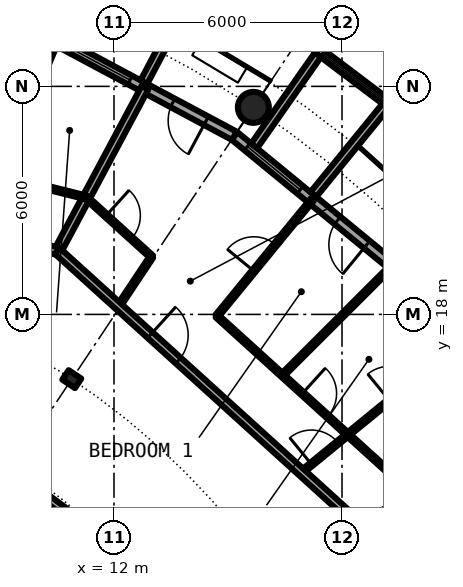
"""IFC4 building model, lengths in metres.
Left out: names, types, materials, properties, quantities, classifications, styles, units other than length and angle.
Written with IfcOpenShell. Run it as: python <this file> out.ifc"""

import sys

from ifc_helpers import new_model, si_unit, direction, frame, frame_2d, origin, origin_2d, place, context, subcontext, project, spatial, rectangle, circle, hollow_circle, i_section, extrude, element, fill, save


model = new_model("IFC4")
c1 = context("Model", 3, precision=1e-05, world=origin(), true_north=direction((0.0, 1.0)))
c2 = subcontext(c1, "Body", "Model", "MODEL_VIEW")
j1 = project(units=[si_unit("LENGTHUNIT", "METRE"), si_unit("PLANEANGLEUNIT", "RADIAN")], contexts=[c1])
p1 = place(None, origin())
s1 = spatial("IfcSite", under=j1, at=p1, CompositionType="ELEMENT")
p2 = place(p1, origin())
s2 = spatial("IfcBuilding", under=s1, at=p2, CompositionType="ELEMENT")
p3 = place(p2, frame((0.0, 0.0, 190.2)))
s3 = spatial("IfcBuildingStorey", under=s2, at=p3, CompositionType="ELEMENT", Elevation=190.2)
p4 = place(p3, frame((15.667, 23.448, 0.0), z_axis=(0.0, 0.0, 1.0), x_axis=(1.0, 0.0, 0.0)))
e1 = element("IfcColumn", 1, at=p4, inside=s3, PredefinedType="COLUMN", context=c2, shape_type="SweptSolid", body=[
    extrude(hollow_circle(Radius=0.406, WallThickness=0.03, at=origin_2d()), origin(), (0.0, 0.0, 1.0), 3.05),
])
p5 = place(p3, frame((10.889, 16.297, 0.0), z_axis=(0.0, 0.0, 1.0), x_axis=(0.55557023302, 0.831469612303, 0.0)))
e2 = element("IfcColumn", 2, at=p5, inside=s3, PredefinedType="COLUMN", context=c2, shape_type="SweptSolid", body=[
    extrude(i_section(OverallWidth=0.3, OverallDepth=0.4, WebThickness=0.013, FlangeThickness=0.024, FilletRadius=0.027, at=origin_2d()), origin(), (0.0, 0.0, 1.0), 3.05),
])
p6 = place(p3, frame((19.304, 19.304, 0.0), z_axis=(0.0, 0.0, 1.0), x_axis=(-0.773019449054, 0.634382322723, 0.0)))
e3 = element("IfcWall", 3, at=p6, inside=s3, PredefinedType="SOLIDWALL", context=c2, shape_type="SweptSolid", body=[
    extrude(rectangle(XDim=5.352, YDim=0.25, at=frame_2d((2.676, 0.0))), origin(), (0.0, 0.0, 1.0), 2.7),
])
p7 = place(p6, frame((0.841, 0.0, 0.0)))
e4 = element("IfcOpeningElement", 4, at=p7, cuts=e3, PredefinedType="OPENING", context=c2, shape_type="SweptSolid", body=[
    extrude(rectangle(XDim=1.0, YDim=2.2, at=frame_2d((0.5, 1.1))), frame((0.0, 0.135, 0.0), z_axis=(0.0, -1.0, 0.0), x_axis=(1.0, 0.0, 0.0)), (0.0, 0.0, 1.0), 0.27),
])
p8 = place(p6, frame((3.111, 0.0, 0.3)))
e5 = element("IfcOpeningElement", 5, at=p8, cuts=e3, PredefinedType="OPENING", context=c2, shape_type="SweptSolid", body=[
    extrude(rectangle(XDim=1.8, YDim=2.1, at=frame_2d((0.9, 1.05))), frame((0.0, 0.135, 0.0), z_axis=(0.0, -1.0, 0.0), x_axis=(1.0, 0.0, 0.0)), (0.0, 0.0, 1.0), 0.27),
])
p9 = place(p3, frame((19.289, 23.497, -0.03), z_axis=(0.0, 0.0, 1.0), x_axis=(-0.797887588059, 0.602806268067, 0.0)))
e6 = element("IfcWall", 6, at=p9, inside=s3, PredefinedType="SOLIDWALL", context=c2, shape_type="SweptSolid", body=[
    extrude(rectangle(XDim=2.447, YDim=0.2, at=frame_2d((1.223, 0.0))), origin(), (0.0, 0.0, 1.0), 2.73),
])
p10 = place(p9, frame((0.183, 0.0, 0.33)))
e7 = element("IfcOpeningElement", 7, at=p10, cuts=e6, PredefinedType="OPENING", context=c2, shape_type="SweptSolid", body=[
    extrude(circle(Radius=1.04, at=frame_2d((1.04, 1.04))), frame((0.0, 0.11, 0.0), z_axis=(0.0, -1.0, 0.0), x_axis=(1.0, 0.0, 0.0)), (0.0, 0.0, 1.0), 0.22),
])
p11 = place(p3, frame((17.246, 21.155, -0.03), z_axis=(0.0, 0.0, 1.0), x_axis=(0.631741648902, 0.775179004516, 0.0)))
e8 = element("IfcWall", 8, at=p11, inside=s3, PredefinedType="SOLIDWALL", context=c2, shape_type="SweptSolid", body=[
    extrude(rectangle(XDim=3.006, YDim=0.2, at=frame_2d((1.503, 0.0))), origin(), (0.0, 0.0, 1.0), 2.73),
])
p12 = place(p3, frame((15.688, 22.433, -0.03), z_axis=(0.0, 0.0, 1.0), x_axis=(0.573260687834, 0.819373043115, 0.0)))
e9 = element("IfcWall", 9, at=p12, inside=s3, PredefinedType="SOLIDWALL", context=c2, shape_type="SweptSolid", body=[
    extrude(rectangle(XDim=2.925, YDim=0.2, at=frame_2d((1.463, 0.0))), origin(), (0.0, 0.0, 1.0), 2.73),
])
p13 = place(p3, frame((15.167, 22.699, 0.0), z_axis=(0.0, 0.0, 1.0), x_axis=(-0.881915646801, 0.471407246368, 0.0)))
e10 = element("IfcWall", 10, at=p13, inside=s3, PredefinedType="SOLIDWALL", context=c2, shape_type="SweptSolid", body=[
    extrude(rectangle(XDim=5.352, YDim=0.25, at=frame_2d((2.676, 0.0))), origin(), (0.0, 0.0, 1.0), 2.7),
])
p14 = place(p13, frame((0.841, 0.0, 0.0)))
e11 = element("IfcOpeningElement", 11, at=p14, cuts=e10, PredefinedType="OPENING", context=c2, shape_type="SweptSolid", body=[
    extrude(rectangle(XDim=1.0, YDim=2.2, at=frame_2d((0.5, 1.1))), frame((0.0, 0.135, 0.0), z_axis=(0.0, -1.0, 0.0), x_axis=(1.0, 0.0, 0.0)), (0.0, 0.0, 1.0), 0.27),
])
p15 = place(p13, frame((3.111, 0.0, 0.3)))
e12 = element("IfcOpeningElement", 12, at=p15, cuts=e10, PredefinedType="OPENING", context=c2, shape_type="SweptSolid", body=[
    extrude(rectangle(XDim=1.8, YDim=2.1, at=frame_2d((0.9, 1.05))), frame((0.0, 0.135, 0.0), z_axis=(0.0, -1.0, 0.0), x_axis=(1.0, 0.0, 0.0)), (0.0, 0.0, 1.0), 0.27),
])
p16 = place(p3, frame((12.787, 24.113, -0.03), z_axis=(0.0, 0.0, 1.0), x_axis=(0.468365282436, 0.883534924159, 0.0)))
e13 = element("IfcWall", 13, at=p16, inside=s3, PredefinedType="SOLIDWALL", context=c2, shape_type="SweptSolid", body=[
    extrude(rectangle(XDim=3.006, YDim=0.2, at=frame_2d((1.503, 0.0))), origin(), (0.0, 0.0, 1.0), 2.73),
])
p17 = place(p3, frame((8.41, 20.193, 0.0), z_axis=(0.0, 0.0, 1.0), x_axis=(0.38420646001, 0.923247202046, 0.0)))
e14 = element("IfcWall", 14, at=p17, inside=s3, PredefinedType="PARTITIONING", context=c2, shape_type="SweptSolid", body=[
    extrude(rectangle(XDim=5.3, YDim=0.1, at=frame_2d((2.65, 0.0))), origin(), (0.0, 0.0, 1.0), 2.7),
])
p18 = place(p17, frame((0.335, 0.0, 0.0)))
e15 = element("IfcOpeningElement", 15, at=p18, cuts=e14, PredefinedType="OPENING", context=c2, shape_type="SweptSolid", body=[
    extrude(rectangle(XDim=0.9, YDim=2.3, at=frame_2d((0.45, 1.15))), frame((0.0, 0.06, 0.0), z_axis=(0.0, -1.0, 0.0), x_axis=(1.0, 0.0, 0.0)), (0.0, 0.0, 1.0), 0.12),
])
p19 = place(p17, frame((2.985, 0.0, 0.0)))
e16 = element("IfcOpeningElement", 16, at=p19, cuts=e14, PredefinedType="OPENING", context=c2, shape_type="SweptSolid", body=[
    extrude(rectangle(XDim=0.9, YDim=2.3, at=frame_2d((0.45, 1.15))), frame((0.0, 0.06, 0.0), z_axis=(0.0, -1.0, 0.0), x_axis=(1.0, 0.0, 0.0)), (0.0, 0.0, 1.0), 0.12),
])
p20 = place(p3, frame((10.516, 19.665, 0.0), z_axis=(0.0, 0.0, 1.0), x_axis=(0.471388689095, 0.881925565903, 0.0)))
e17 = element("IfcWall", 17, at=p20, inside=s3, PredefinedType="PARTITIONING", context=c2, shape_type="SweptSolid", body=[
    extrude(rectangle(XDim=4.875, YDim=0.2, at=frame_2d((2.438, 0.0))), origin(), (0.0, 0.0, 1.0), 2.7),
])
p21 = place(p3, frame((12.118, 18.211, 0.0), z_axis=(0.0, 0.0, 1.0), x_axis=(0.554125989098, 0.832432813028, 0.0)))
e18 = element("IfcWall", 18, at=p21, inside=s3, PredefinedType="PARTITIONING", context=c2, shape_type="SweptSolid", body=[
    extrude(rectangle(XDim=1.57, YDim=0.1, at=frame_2d((0.785, 0.0))), origin(), (0.0, 0.0, 1.0), 2.7),
])
p22 = place(p3, frame((14.709, 17.958, 0.0), z_axis=(0.0, 0.0, 1.0), x_axis=(0.633590098448, 0.773668913133, 0.0)))
e19 = element("IfcWall", 19, at=p22, inside=s3, PredefinedType="PARTITIONING", context=c2, shape_type="SweptSolid", body=[
    extrude(rectangle(XDim=3.962, YDim=0.1, at=frame_2d((1.981, 0.0))), origin(), (0.0, 0.0, 1.0), 2.7),
])
p23 = place(p22, frame((1.531, 0.0, 0.0)))
e20 = element("IfcOpeningElement", 20, at=p23, cuts=e19, PredefinedType="OPENING", context=c2, shape_type="SweptSolid", body=[
    extrude(rectangle(XDim=0.9, YDim=2.3, at=frame_2d((0.45, 1.15))), frame((0.0, 0.06, 0.0), z_axis=(0.0, -1.0, 0.0), x_axis=(1.0, 0.0, 0.0)), (0.0, 0.0, 1.0), 0.12),
])
p24 = place(p3, frame((16.43, 16.398, 0.0), z_axis=(0.0, 0.0, 1.0), x_axis=(0.707722727509, 0.706490297858, 0.0)))
e21 = element("IfcWall", 21, at=p24, inside=s3, PredefinedType="PARTITIONING", context=c2, shape_type="SweptSolid", body=[
    extrude(rectangle(XDim=3.962, YDim=0.1, at=frame_2d((1.981, 0.0))), origin(), (0.0, 0.0, 1.0), 2.7),
])
p25 = place(p3, frame((16.936, 13.845, 0.0), z_axis=(0.0, 0.0, 1.0), x_axis=(0.774310172558, 0.632806255241, 0.0)))
e22 = element("IfcWall", 22, at=p25, inside=s3, PredefinedType="PARTITIONING", context=c2, shape_type="SweptSolid", body=[
    extrude(rectangle(XDim=5.3, YDim=0.1, at=frame_2d((2.65, 0.0))), origin(), (0.0, 0.0, 1.0), 2.7),
])
p26 = place(p25, frame((0.335, 0.0, 0.0)))
e23 = element("IfcOpeningElement", 23, at=p26, cuts=e22, PredefinedType="OPENING", context=c2, shape_type="SweptSolid", body=[
    extrude(rectangle(XDim=0.9, YDim=2.3, at=frame_2d((0.45, 1.15))), frame((0.0, 0.06, 0.0), z_axis=(0.0, -1.0, 0.0), x_axis=(1.0, 0.0, 0.0)), (0.0, 0.0, 1.0), 0.12),
])
p27 = place(p25, frame((2.985, 0.0, 0.0)))
e24 = element("IfcOpeningElement", 24, at=p27, cuts=e22, PredefinedType="OPENING", context=c2, shape_type="SweptSolid", body=[
    extrude(rectangle(XDim=0.9, YDim=2.3, at=frame_2d((0.45, 1.15))), frame((0.0, 0.06, 0.0), z_axis=(0.0, -1.0, 0.0), x_axis=(1.0, 0.0, 0.0)), (0.0, 0.0, 1.0), 0.12),
])
p28 = place(p3, frame((18.542, 12.389, 0.0), z_axis=(0.0, 0.0, 1.0), x_axis=(0.831387096605, 0.55569370664, 0.0)))
e25 = element("IfcWall", 25, at=p28, inside=s3, PredefinedType="PARTITIONING", context=c2, shape_type="SweptSolid", body=[
    extrude(rectangle(XDim=4.875, YDim=0.2, at=frame_2d((2.438, 0.0))), origin(), (0.0, 0.0, 1.0), 2.7),
])
p29 = place(p3, frame((5.137, 16.938, 0.0), z_axis=(0.0, 0.0, 1.0), x_axis=(0.803240181354, -0.595655278712, 0.0)))
e26 = element("IfcWall", 26, at=p29, inside=s3, PredefinedType="PARTITIONING", context=c2, shape_type="SweptSolid", body=[
    extrude(rectangle(XDim=11.928, YDim=0.2, at=frame_2d((5.964, 0.0))), origin(), (0.0, 0.0, 1.0), 2.7),
])
p30 = place(p29, frame((4.612, 0.0, 0.0)))
e27 = element("IfcOpeningElement", 27, at=p30, cuts=e26, PredefinedType="OPENING", context=c2, shape_type="SweptSolid", body=[
    extrude(rectangle(XDim=1.0, YDim=2.3, at=frame_2d((0.5, 1.15))), frame((0.0, 0.11, 0.0), z_axis=(0.0, -1.0, 0.0), x_axis=(1.0, 0.0, 0.0)), (0.0, 0.0, 1.0), 0.22),
])
p31 = place(p3, frame((0.0, 22.3, 0.0), z_axis=(0.0, 0.0, 1.0), x_axis=(0.969975443945, -0.243202874456, 0.0)))
e28 = element("IfcWall", 28, at=p31, inside=s3, PredefinedType="PARTITIONING", context=c2, shape_type="SweptSolid", body=[
    extrude(rectangle(XDim=10.847, YDim=0.2, at=frame_2d((5.423, 0.0))), origin(), (0.0, 0.0, 1.0), 2.7),
])
p32 = place(p31, frame((4.918, 0.0, 0.0)))
e29 = element("IfcOpeningElement", 29, at=p32, cuts=e28, PredefinedType="OPENING", context=c2, shape_type="SweptSolid", body=[
    extrude(rectangle(XDim=1.0, YDim=2.3, at=frame_2d((0.5, 1.15))), frame((0.0, 0.11, 0.0), z_axis=(0.0, -1.0, 0.0), x_axis=(1.0, 0.0, 0.0)), (0.0, 0.0, 1.0), 0.22),
])
p33 = place(p3, frame((10.512, 19.667, 0.0), z_axis=(0.0, 0.0, 1.0), x_axis=(0.740853508928, -0.671666642248, 0.0)))
e30 = element("IfcWall", 30, at=p33, inside=s3, PredefinedType="PARTITIONING", context=c2, shape_type="SweptSolid", body=[
    extrude(rectangle(XDim=10.84, YDim=0.2, at=frame_2d((5.42, 0.0))), origin(), (0.0, 0.0, 1.0), 2.7),
])
p34 = place(p33, frame((3.293, 0.0, 0.0)))
e31 = element("IfcOpeningElement", 31, at=p34, cuts=e30, PredefinedType="OPENING", context=c2, shape_type="SweptSolid", body=[
    extrude(rectangle(XDim=1.0, YDim=2.3, at=frame_2d((0.5, 1.15))), frame((0.0, 0.11, 0.0), z_axis=(0.0, -1.0, 0.0), x_axis=(1.0, 0.0, 0.0)), (0.0, 0.0, 1.0), 0.22),
])
p35 = place(p3, frame((4.502, 22.771, 0.0), z_axis=(0.0, 0.0, 1.0), x_axis=(0.970072433546, -0.242815719578, 0.0)))
e32 = element("IfcWall", 32, at=p35, inside=s3, PredefinedType="PARTITIONING", context=c2, shape_type="SweptSolid", body=[
    extrude(rectangle(XDim=6.973, YDim=0.1, at=frame_2d((3.486, 0.0))), origin(), (0.0, 0.0, 1.0), 2.7),
])
p36 = place(p35, frame((3.036, 0.0, 0.0)))
e33 = element("IfcOpeningElement", 33, at=p36, cuts=e32, PredefinedType="OPENING", context=c2, shape_type="SweptSolid", body=[
    extrude(rectangle(XDim=0.9, YDim=2.3, at=frame_2d((0.45, 1.15))), frame((0.0, 0.06, 0.0), z_axis=(0.0, -1.0, 0.0), x_axis=(1.0, 0.0, 0.0)), (0.0, 0.0, 1.0), 0.12),
])
p37 = place(p3, frame((11.271, 21.074, 0.0), z_axis=(0.0, 0.0, 1.0), x_axis=(0.74087097024, -0.671647381783, 0.0)))
e34 = element("IfcWall", 34, at=p37, inside=s3, PredefinedType="PARTITIONING", context=c2, shape_type="SweptSolid", body=[
    extrude(rectangle(XDim=2.324, YDim=0.1, at=frame_2d((1.162, 0.0))), origin(), (0.0, 0.0, 1.0), 2.7),
])
p38 = place(p37, frame((0.705, 0.0, 0.0)))
e35 = element("IfcOpeningElement", 35, at=p38, cuts=e34, PredefinedType="OPENING", context=c2, shape_type="SweptSolid", body=[
    extrude(rectangle(XDim=0.9, YDim=2.3, at=frame_2d((0.45, 1.15))), frame((0.0, 0.06, 0.0), z_axis=(0.0, -1.0, 0.0), x_axis=(1.0, 0.0, 0.0)), (0.0, 0.0, 1.0), 0.12),
])
p39 = place(p3, frame((14.709, 17.958, 0.0), z_axis=(0.0, 0.0, 1.0), x_axis=(0.740923753351, -0.671589153962, 0.0)))
e36 = element("IfcWall", 36, at=p39, inside=s3, PredefinedType="PARTITIONING", context=c2, shape_type="SweptSolid", body=[
    extrude(rectangle(XDim=6.969, YDim=0.1, at=frame_2d((3.484, 0.0))), origin(), (0.0, 0.0, 1.0), 2.7),
])
p40 = place(p39, frame((3.034, 0.0, 0.0)))
e37 = element("IfcOpeningElement", 37, at=p40, cuts=e36, PredefinedType="OPENING", context=c2, shape_type="SweptSolid", body=[
    extrude(rectangle(XDim=0.9, YDim=2.3, at=frame_2d((0.45, 1.15))), frame((0.0, 0.06, 0.0), z_axis=(0.0, -1.0, 0.0), x_axis=(1.0, 0.0, 0.0)), (0.0, 0.0, 1.0), 0.12),
])
p41 = place(p7, origin())
e38 = element("IfcDoor", 38, at=p41, inside=s3, OperationType="SINGLE_SWING_LEFT", PredefinedType="DOOR", context=c2, shape_type="SweptSolid", body=[
    extrude(rectangle(XDim=1.0, YDim=2.2, at=frame_2d((0.5, 1.1))), frame((0.0, 0.025, 0.0), z_axis=(0.0, -1.0, 0.0), x_axis=(1.0, 0.0, 0.0)), (0.0, 0.0, 1.0), 0.05),
])
fill(e4, e38)
p42 = place(p8, origin())
e39 = element("IfcWindow", 39, at=p42, inside=s3, PartitioningType="SINGLE_PANEL", PredefinedType="WINDOW", context=c2, shape_type="SweptSolid", body=[
    extrude(rectangle(XDim=1.8, YDim=2.1, at=frame_2d((0.9, 1.05))), frame((0.0, 0.03, 0.0), z_axis=(0.0, -1.0, 0.0), x_axis=(1.0, 0.0, 0.0)), (0.0, 0.0, 1.0), 0.06),
])
fill(e5, e39)
p43 = place(p10, origin())
e40 = element("IfcWindow", 40, at=p43, inside=s3, PartitioningType="SINGLE_PANEL", PredefinedType="WINDOW", context=c2, shape_type="SweptSolid", body=[
    extrude(circle(Radius=1.04, at=frame_2d((1.04, 1.04))), frame((0.0, 0.03, 0.0), z_axis=(0.0, -1.0, 0.0), x_axis=(1.0, 0.0, 0.0)), (0.0, 0.0, 1.0), 0.06),
])
fill(e7, e40)
p44 = place(p14, origin())
e41 = element("IfcDoor", 41, at=p44, inside=s3, OperationType="SINGLE_SWING_LEFT", PredefinedType="DOOR", context=c2, shape_type="SweptSolid", body=[
    extrude(rectangle(XDim=1.0, YDim=2.2, at=frame_2d((0.5, 1.1))), frame((0.0, 0.025, 0.0), z_axis=(0.0, -1.0, 0.0), x_axis=(1.0, 0.0, 0.0)), (0.0, 0.0, 1.0), 0.05),
])
fill(e11, e41)
p45 = place(p15, origin())
e42 = element("IfcWindow", 42, at=p45, inside=s3, PartitioningType="SINGLE_PANEL", PredefinedType="WINDOW", context=c2, shape_type="SweptSolid", body=[
    extrude(rectangle(XDim=1.8, YDim=2.1, at=frame_2d((0.9, 1.05))), frame((0.0, 0.03, 0.0), z_axis=(0.0, -1.0, 0.0), x_axis=(1.0, 0.0, 0.0)), (0.0, 0.0, 1.0), 0.06),
])
fill(e12, e42)
p46 = place(p34, origin())
e43 = element("IfcDoor", 43, at=p46, inside=s3, OperationType="SINGLE_SWING_LEFT", PredefinedType="DOOR", context=c2, shape_type="SweptSolid", body=[
    extrude(rectangle(XDim=1.0, YDim=2.3, at=frame_2d((0.5, 1.15))), frame((0.0, 0.025, 0.0), z_axis=(0.0, -1.0, 0.0), x_axis=(1.0, 0.0, 0.0)), (0.0, 0.0, 1.0), 0.05),
])
fill(e31, e43)
p47 = place(p38, origin())
e44 = element("IfcDoor", 44, at=p47, inside=s3, OperationType="SINGLE_SWING_LEFT", PredefinedType="DOOR", context=c2, shape_type="SweptSolid", body=[
    extrude(rectangle(XDim=0.9, YDim=2.3, at=frame_2d((0.45, 1.15))), frame((0.0, 0.025, 0.0), z_axis=(0.0, -1.0, 0.0), x_axis=(1.0, 0.0, 0.0)), (0.0, 0.0, 1.0), 0.05),
])
fill(e35, e44)
p48 = place(p26, origin())
e45 = element("IfcDoor", 45, at=p48, inside=s3, OperationType="SINGLE_SWING_LEFT", PredefinedType="DOOR", context=c2, shape_type="SweptSolid", body=[
    extrude(rectangle(XDim=0.9, YDim=2.3, at=frame_2d((0.45, 1.15))), frame((0.0, 0.025, 0.0), z_axis=(0.0, -1.0, 0.0), x_axis=(1.0, 0.0, 0.0)), (0.0, 0.0, 1.0), 0.05),
])
fill(e23, e45)
p49 = place(p23, origin())
e46 = element("IfcDoor", 46, at=p49, inside=s3, OperationType="SINGLE_SWING_RIGHT", PredefinedType="DOOR", context=c2, shape_type="SweptSolid", body=[
    extrude(rectangle(XDim=0.9, YDim=2.3, at=frame_2d((0.45, 1.15))), frame((0.0, 0.025, 0.0), z_axis=(0.0, -1.0, 0.0), x_axis=(1.0, 0.0, 0.0)), (0.0, 0.0, 1.0), 0.05),
])
fill(e20, e46)
p50 = place(p40, origin())
e47 = element("IfcDoor", 47, at=p50, inside=s3, OperationType="SINGLE_SWING_LEFT", PredefinedType="DOOR", context=c2, shape_type="SweptSolid", body=[
    extrude(rectangle(XDim=0.9, YDim=2.3, at=frame_2d((0.45, 1.15))), frame((0.0, 0.025, 0.0), z_axis=(0.0, -1.0, 0.0), x_axis=(1.0, 0.0, 0.0)), (0.0, 0.0, 1.0), 0.05),
])
fill(e37, e47)
save(model, sys.argv[1])
